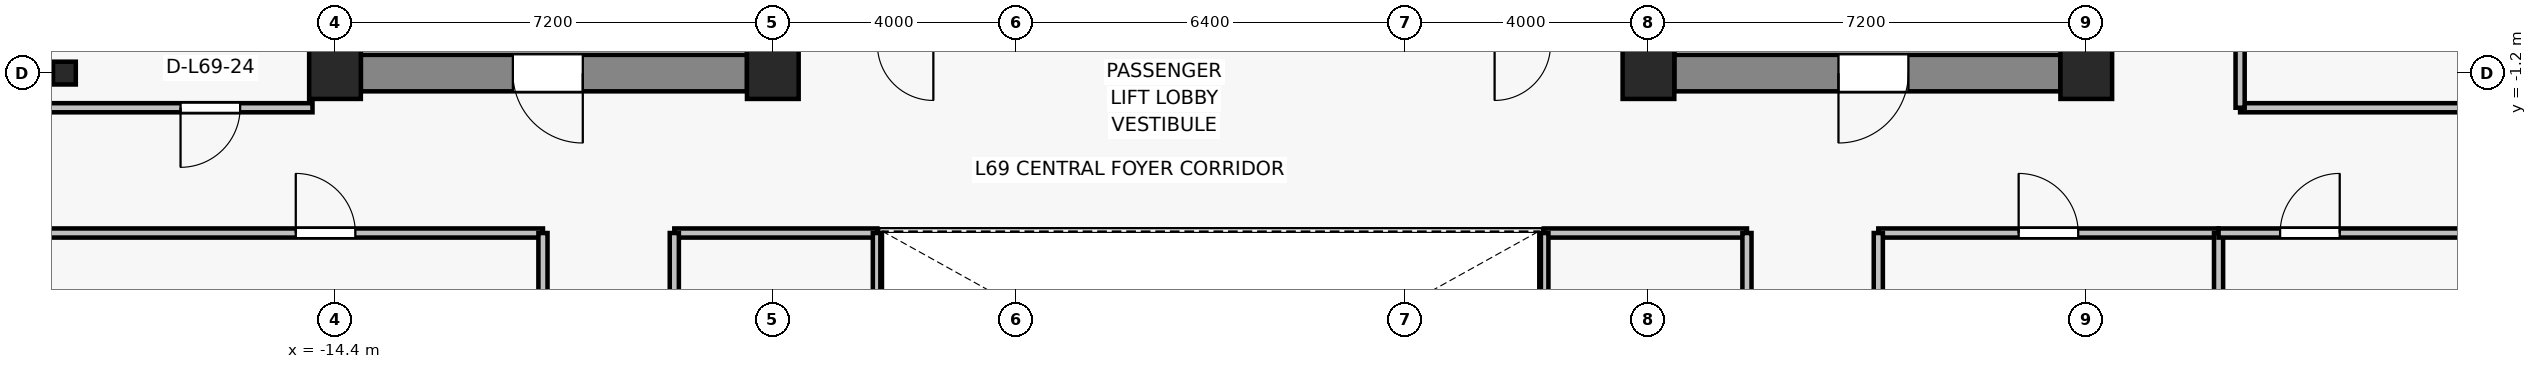
"""IFC4 building model, lengths in metres.
Left out: names, types, materials, properties, quantities, classifications, styles, units other than length and angle.
Written with IfcOpenShell. Run it as: python <this file> out.ifc"""

import sys

from ifc_helpers import new_model, si_unit, direction, frame, frame_2d, origin, origin_2d, place, context, subcontext, project, spatial, rectangle, i_section, extrude, source, transform, mapped, element, fill, save


model = new_model("IFC4")
c1 = context("Model", 3, precision=1e-05, world=origin(), true_north=direction((0.0, 1.0)))
c2 = subcontext(c1, "Body", "Model", "MODEL_VIEW")
j1 = project(units=[si_unit("LENGTHUNIT", "METRE"), si_unit("PLANEANGLEUNIT", "RADIAN")], contexts=[c1])
p1 = place(None, origin())
s1 = spatial("IfcSite", under=j1, at=p1, CompositionType="ELEMENT")
p2 = place(p1, origin())
s2 = spatial("IfcBuilding", under=s1, at=p2, CompositionType="ELEMENT")
p3 = place(p2, frame((0.0, 0.0, 245.2)))
s3 = spatial("IfcBuildingStorey", under=s2, at=p3, CompositionType="ELEMENT", Elevation=245.2)
for number, where, z_axis, x_axis in (
    (1, (-14.4, -1.2, 0.0), (0.0, 0.0, 1.0), (1.0, 0.0, 0.0)),
    (2, (-7.2, -1.2, 0.0), (0.0, 0.0, 1.0), (1.0, 0.0, 0.0)),
    (3, (7.2, -1.2, 0.0), (0.0, 0.0, 1.0), (1.0, 0.0, 0.0)),
    (4, (14.4, -1.2, 0.0), (0.0, 0.0, 1.0), (1.0, 0.0, 0.0)),
):
    element("IfcColumn", number, at=place(p3, frame(where, z_axis=z_axis, x_axis=x_axis)), inside=s3, PredefinedType="COLUMN", context=c2, shape_type="SweptSolid", body=[
        extrude(rectangle(XDim=0.85, YDim=0.85, at=origin_2d()), origin(), (0.0, 0.0, 1.0), 3.3),
    ])
p4 = place(p3, frame((-18.85, -1.2, 0.0), z_axis=(0.0, 0.0, 1.0), x_axis=(1.0, 0.0, 0.0)))
e5 = element("IfcColumn", 5, at=p4, inside=s3, PredefinedType="COLUMN", context=c2, shape_type="SweptSolid", body=[
    extrude(i_section(OverallWidth=0.375, OverallDepth=0.375, WebThickness=0.017, FlangeThickness=0.027, FilletRadius=0.015, at=origin_2d()), origin(), (0.0, 0.0, 1.0), 3.3),
])
p5 = place(p3, frame((-7.625, -1.2, 0.0), z_axis=(0.0, 0.0, 1.0), x_axis=(-1.0, 0.0, 0.0)))
e6 = element("IfcWall", 6, at=p5, inside=s3, PredefinedType="SHEAR", context=c2, shape_type="SweptSolid", body=[
    extrude(rectangle(XDim=6.35, YDim=0.6, at=frame_2d((3.175, 0.0))), origin(), (0.0, 0.0, 1.0), 3.075),
])
p6 = place(p5, frame((2.7, 0.0, 0.0)))
e7 = element("IfcOpeningElement", 7, at=p6, cuts=e6, PredefinedType="OPENING", context=c2, shape_type="SweptSolid", body=[
    extrude(rectangle(XDim=1.15, YDim=2.15, at=frame_2d((0.575, 1.075))), frame((0.0, 0.31, 0.0), z_axis=(0.0, -1.0, 0.0), x_axis=(1.0, 0.0, 0.0)), (0.0, 0.0, 1.0), 0.62),
])
p7 = place(p3, frame((13.975, -1.2, 0.0), z_axis=(0.0, 0.0, 1.0), x_axis=(-1.0, 0.0, 0.0)))
e8 = element("IfcWall", 8, at=p7, inside=s3, PredefinedType="SHEAR", context=c2, shape_type="SweptSolid", body=[
    extrude(rectangle(XDim=6.35, YDim=0.6, at=frame_2d((3.175, 0.0))), origin(), (0.0, 0.0, 1.0), 3.075),
])
p8 = place(p7, frame((2.5, 0.0, 0.0)))
e9 = element("IfcOpeningElement", 9, at=p8, cuts=e8, PredefinedType="OPENING", context=c2, shape_type="SweptSolid", body=[
    extrude(rectangle(XDim=1.15, YDim=2.15, at=frame_2d((0.575, 1.075))), frame((0.0, 0.31, 0.0), z_axis=(0.0, -1.0, 0.0), x_axis=(1.0, 0.0, 0.0)), (0.0, 0.0, 1.0), 0.62),
])
for number, where, z_axis, x_axis in (
    (10, (-7.4, -0.9, 0.0), (0.0, 0.0, 1.0), (0.0, 1.0, 0.0)),
    (11, (7.4, -0.9, 0.0), (0.0, 0.0, 1.0), (0.0, 1.0, 0.0)),
):
    element("IfcWall", number, at=place(p3, frame(where, z_axis=z_axis, x_axis=x_axis)), inside=s3, PredefinedType="SHEAR", context=c2, shape_type="SweptSolid", body=[
        extrude(rectangle(XDim=4.15, YDim=0.45, at=frame_2d((2.075, 0.0))), origin(), (0.0, 0.0, 1.0), 3.075),
    ])
p9 = place(p3, frame((-19.53, -3.83, 0.0), z_axis=(0.0, 0.0, 1.0), x_axis=(1.0, 0.0, 0.0)))
e12 = element("IfcWall", 12, at=p9, inside=s3, PredefinedType="PARTITIONING", context=c2, shape_type="SweptSolid", body=[
    extrude(rectangle(XDim=8.55, YDim=0.15, at=frame_2d((4.275, 0.0))), origin(), (0.0, 0.0, 1.0), 2.615),
])
p10 = place(p9, frame((4.485, 0.0, 0.0)))
e13 = element("IfcOpeningElement", 13, at=p10, cuts=e12, PredefinedType="OPENING", context=c2, shape_type="SweptSolid", body=[
    extrude(rectangle(XDim=0.98, YDim=2.15, at=frame_2d((0.49, 1.075))), frame((0.0, 0.085, 0.0), z_axis=(0.0, -1.0, 0.0), x_axis=(1.0, 0.0, 0.0)), (0.0, 0.0, 1.0), 0.17),
])
p11 = place(p3, frame((-10.98, -3.83, 0.0), z_axis=(0.0, 0.0, 1.0), x_axis=(0.0, -1.0, 0.0)))
e14 = element("IfcWall", 14, at=p11, inside=s3, PredefinedType="PARTITIONING", context=c2, shape_type="SweptSolid", body=[
    extrude(rectangle(XDim=5.69, YDim=0.15, at=frame_2d((2.845, 0.0))), origin(), (0.0, 0.0, 1.0), 2.615),
])
p12 = place(p3, frame((10.98, -3.83, 0.0), z_axis=(0.0, 0.0, 1.0), x_axis=(1.0, 0.0, 0.0)))
e15 = element("IfcWall", 15, at=p12, inside=s3, PredefinedType="PARTITIONING", context=c2, shape_type="SweptSolid", body=[
    extrude(rectangle(XDim=5.596, YDim=0.15, at=frame_2d((2.798, 0.0))), origin(), (0.0, 0.0, 1.0), 2.615),
])
p13 = place(p12, frame((2.308, 0.0, 0.0)))
e16 = element("IfcOpeningElement", 16, at=p13, cuts=e15, PredefinedType="OPENING", context=c2, shape_type="SweptSolid", body=[
    extrude(rectangle(XDim=0.98, YDim=2.15, at=frame_2d((0.49, 1.075))), frame((0.0, 0.085, 0.0), z_axis=(0.0, -1.0, 0.0), x_axis=(1.0, 0.0, 0.0)), (0.0, 0.0, 1.0), 0.17),
])
for number, where, z_axis, x_axis in (
    (17, (10.98, -9.52, 0.0), (0.0, 0.0, 1.0), (0.0, 1.0, 0.0)),
    (18, (16.576, -3.83, 0.0), (0.0, 0.0, 1.0), (0.0, -1.0, 0.0)),
):
    element("IfcWall", number, at=place(p3, frame(where, z_axis=z_axis, x_axis=x_axis)), inside=s3, PredefinedType="PARTITIONING", context=c2, shape_type="SweptSolid", body=[
        extrude(rectangle(XDim=5.69, YDim=0.15, at=frame_2d((2.845, 0.0))), origin(), (0.0, 0.0, 1.0), 2.615),
    ])
p14 = place(p3, frame((16.576, -3.83, 0.0), z_axis=(0.0, 0.0, 1.0), x_axis=(1.0, 0.0, 0.0)))
e19 = element("IfcWall", 19, at=p14, inside=s3, PredefinedType="PARTITIONING", context=c2, shape_type="SweptSolid", body=[
    extrude(rectangle(XDim=6.954, YDim=0.15, at=frame_2d((3.477, 0.0))), origin(), (0.0, 0.0, 1.0), 2.765),
])
p15 = place(p14, frame((1.012, 0.0, 0.0)))
e20 = element("IfcOpeningElement", 20, at=p15, cuts=e19, PredefinedType="OPENING", context=c2, shape_type="SweptSolid", body=[
    extrude(rectangle(XDim=0.98, YDim=2.15, at=frame_2d((0.49, 1.075))), frame((0.0, 0.085, 0.0), z_axis=(0.0, -1.0, 0.0), x_axis=(1.0, 0.0, 0.0)), (0.0, 0.0, 1.0), 0.17),
])
p16 = place(p3, frame((-8.82, -3.83, 0.0), z_axis=(0.0, 0.0, 1.0), x_axis=(1.0, 0.0, 0.0)))
e21 = element("IfcWall", 21, at=p16, inside=s3, PredefinedType="PARTITIONING", context=c2, shape_type="SweptSolid", body=[
    extrude(rectangle(XDim=3.34, YDim=0.15, at=frame_2d((1.67, 0.0))), origin(), (0.0, 0.0, 1.0), 2.615),
])
p17 = place(p3, frame((-8.82, -9.52, 0.0), z_axis=(0.0, 0.0, 1.0), x_axis=(0.0, 1.0, 0.0)))
e22 = element("IfcWall", 22, at=p17, inside=s3, PredefinedType="PARTITIONING", context=c2, shape_type="SweptSolid", body=[
    extrude(rectangle(XDim=5.69, YDim=0.15, at=frame_2d((2.845, 0.0))), origin(), (0.0, 0.0, 1.0), 2.615),
])
p18 = place(p17, frame((2.355, 0.0, 0.0)))
e23 = element("IfcOpeningElement", 23, at=p18, cuts=e22, PredefinedType="OPENING", context=c2, shape_type="SweptSolid", body=[
    extrude(rectangle(XDim=0.98, YDim=2.15, at=frame_2d((0.49, 1.075))), frame((0.0, 0.085, 0.0), z_axis=(0.0, -1.0, 0.0), x_axis=(1.0, 0.0, 0.0)), (0.0, 0.0, 1.0), 0.17),
])
p19 = place(p3, frame((-5.48, -3.83, 0.0), z_axis=(0.0, 0.0, 1.0), x_axis=(0.0, -1.0, 0.0)))
e24 = element("IfcWall", 24, at=p19, inside=s3, PredefinedType="PARTITIONING", context=c2, shape_type="SweptSolid", body=[
    extrude(rectangle(XDim=5.69, YDim=0.15, at=frame_2d((2.845, 0.0))), origin(), (0.0, 0.0, 1.0), 2.615),
])
p20 = place(p3, frame((5.48, -3.83, 0.0), z_axis=(0.0, 0.0, 1.0), x_axis=(1.0, 0.0, 0.0)))
e25 = element("IfcWall", 25, at=p20, inside=s3, PredefinedType="PARTITIONING", context=c2, shape_type="SweptSolid", body=[
    extrude(rectangle(XDim=3.34, YDim=0.15, at=frame_2d((1.67, 0.0))), origin(), (0.0, 0.0, 1.0), 2.615),
])
p21 = place(p3, frame((5.48, -9.52, 0.0), z_axis=(0.0, 0.0, 1.0), x_axis=(0.0, 1.0, 0.0)))
e26 = element("IfcWall", 26, at=p21, inside=s3, PredefinedType="PARTITIONING", context=c2, shape_type="SweptSolid", body=[
    extrude(rectangle(XDim=5.69, YDim=0.15, at=frame_2d((2.845, 0.0))), origin(), (0.0, 0.0, 1.0), 2.615),
])
p22 = place(p3, frame((8.82, -3.83, 0.0), z_axis=(0.0, 0.0, 1.0), x_axis=(0.0, -1.0, 0.0)))
e27 = element("IfcWall", 27, at=p22, inside=s3, PredefinedType="PARTITIONING", context=c2, shape_type="SweptSolid", body=[
    extrude(rectangle(XDim=5.69, YDim=0.15, at=frame_2d((2.845, 0.0))), origin(), (0.0, 0.0, 1.0), 2.615),
])
p23 = place(p22, frame((2.355, 0.0, 0.0)))
e28 = element("IfcOpeningElement", 28, at=p23, cuts=e27, PredefinedType="OPENING", context=c2, shape_type="SweptSolid", body=[
    extrude(rectangle(XDim=0.98, YDim=2.15, at=frame_2d((0.49, 1.075))), frame((0.0, 0.085, 0.0), z_axis=(0.0, -1.0, 0.0), x_axis=(1.0, 0.0, 0.0)), (0.0, 0.0, 1.0), 0.17),
])
p24 = place(p3, frame((-14.77, -1.77, 0.0), z_axis=(0.0, 0.0, 1.0), x_axis=(-1.0, 0.0, 0.0)))
e29 = element("IfcWall", 29, at=p24, inside=s3, PredefinedType="PARTITIONING", context=c2, shape_type="SweptSolid", body=[
    extrude(rectangle(XDim=4.76, YDim=0.15, at=frame_2d((2.38, 0.0))), origin(), (0.0, 0.0, 1.0), 2.765),
])
p25 = place(p24, frame((1.19, 0.0, 0.0)))
e30 = element("IfcOpeningElement", 30, at=p25, cuts=e29, PredefinedType="OPENING", context=c2, shape_type="SweptSolid", body=[
    extrude(rectangle(XDim=0.98, YDim=2.15, at=frame_2d((0.49, 1.075))), frame((0.0, 0.085, 0.0), z_axis=(0.0, -1.0, 0.0), x_axis=(1.0, 0.0, 0.0)), (0.0, 0.0, 1.0), 0.17),
])
p26 = place(p3, frame((23.53, -1.77, 0.0), z_axis=(0.0, 0.0, 1.0), x_axis=(-1.0, 0.0, 0.0)))
e31 = element("IfcWall", 31, at=p26, inside=s3, PredefinedType="PARTITIONING", context=c2, shape_type="SweptSolid", body=[
    extrude(rectangle(XDim=6.6, YDim=0.15, at=frame_2d((3.3, 0.0))), origin(), (0.0, 0.0, 1.0), 2.765),
])
p27 = place(p3, frame((16.93, -1.77, 0.0), z_axis=(0.0, 0.0, 1.0), x_axis=(0.0, 1.0, 0.0)))
e32 = element("IfcWall", 32, at=p27, inside=s3, PredefinedType="PARTITIONING", context=c2, shape_type="SweptSolid", body=[
    extrude(rectangle(XDim=15.65, YDim=0.15, at=frame_2d((7.825, 0.0))), origin(), (0.0, 0.0, 1.0), 2.615),
])
p28 = place(p27, frame((7.335, 0.0, 0.0)))
e33 = element("IfcOpeningElement", 33, at=p28, cuts=e32, PredefinedType="OPENING", context=c2, shape_type="SweptSolid", body=[
    extrude(rectangle(XDim=0.98, YDim=2.15, at=frame_2d((0.49, 1.075))), frame((0.0, 0.085, 0.0), z_axis=(0.0, -1.0, 0.0), x_axis=(1.0, 0.0, 0.0)), (0.0, 0.0, 1.0), 0.17),
])
m1 = source(origin(), c2, "Body", "SweptSolid", [
    extrude(rectangle(XDim=1.15, YDim=2.15, at=frame_2d((0.575, 1.075))), frame((0.0, 0.025, 0.0), z_axis=(0.0, -1.0, 0.0), x_axis=(1.0, 0.0, 0.0)), (0.0, 0.0, 1.0), 0.05),
])
p29 = place(p6, origin())
e34 = element("IfcDoor", 34, at=p29, inside=s3, OperationType="SINGLE_SWING_LEFT", PredefinedType="DOOR", context=c2, shape_type="MappedRepresentation", body=[
    mapped(m1, transform((0.0, 0.0, 0.0), x_axis=(1.0, 0.0, 0.0), y_axis=(0.0, 1.0, 0.0), z_axis=(0.0, 0.0, 1.0), scale=1.0)),
])
fill(e7, e34)
p30 = place(p8, origin())
e35 = element("IfcDoor", 35, at=p30, inside=s3, OperationType="SINGLE_SWING_RIGHT", PredefinedType="DOOR", context=c2, shape_type="MappedRepresentation", body=[
    mapped(m1, transform((0.0, 0.0, 0.0), x_axis=(1.0, 0.0, 0.0), y_axis=(0.0, 1.0, 0.0), z_axis=(0.0, 0.0, 1.0), scale=1.0)),
])
fill(e9, e35)
m2 = source(origin(), c2, "Body", "SweptSolid", [
    extrude(rectangle(XDim=0.98, YDim=2.15, at=frame_2d((0.49, 1.075))), frame((0.0, 0.025, 0.0), z_axis=(0.0, -1.0, 0.0), x_axis=(1.0, 0.0, 0.0)), (0.0, 0.0, 1.0), 0.05),
])
p31 = place(p10, origin())
e36 = element("IfcDoor", 36, at=p31, inside=s3, OperationType="SINGLE_SWING_LEFT", PredefinedType="DOOR", context=c2, shape_type="MappedRepresentation", body=[
    mapped(m2, transform((0.0, 0.0, 0.0), x_axis=(1.0, 0.0, 0.0), y_axis=(0.0, 1.0, 0.0), z_axis=(0.0, 0.0, 1.0), scale=1.0)),
])
fill(e13, e36)
p32 = place(p13, origin())
e37 = element("IfcDoor", 37, at=p32, inside=s3, OperationType="SINGLE_SWING_LEFT", PredefinedType="DOOR", context=c2, shape_type="MappedRepresentation", body=[
    mapped(m2, transform((0.0, 0.0, 0.0), x_axis=(1.0, 0.0, 0.0), y_axis=(0.0, 1.0, 0.0), z_axis=(0.0, 0.0, 1.0), scale=1.0)),
])
fill(e16, e37)
p33 = place(p15, origin())
e38 = element("IfcDoor", 38, at=p33, inside=s3, OperationType="SINGLE_SWING_RIGHT", PredefinedType="DOOR", context=c2, shape_type="MappedRepresentation", body=[
    mapped(m2, transform((0.0, 0.0, 0.0), x_axis=(1.0, 0.0, 0.0), y_axis=(0.0, 1.0, 0.0), z_axis=(0.0, 0.0, 1.0), scale=1.0)),
])
fill(e20, e38)
p34 = place(p25, origin())
e39 = element("IfcDoor", 39, at=p34, inside=s3, OperationType="SINGLE_SWING_RIGHT", PredefinedType="DOOR", context=c2, shape_type="MappedRepresentation", body=[
    mapped(m2, transform((0.0, 0.0, 0.0), x_axis=(1.0, 0.0, 0.0), y_axis=(0.0, 1.0, 0.0), z_axis=(0.0, 0.0, 1.0), scale=1.0)),
])
fill(e30, e39)
save(model, sys.argv[1])
